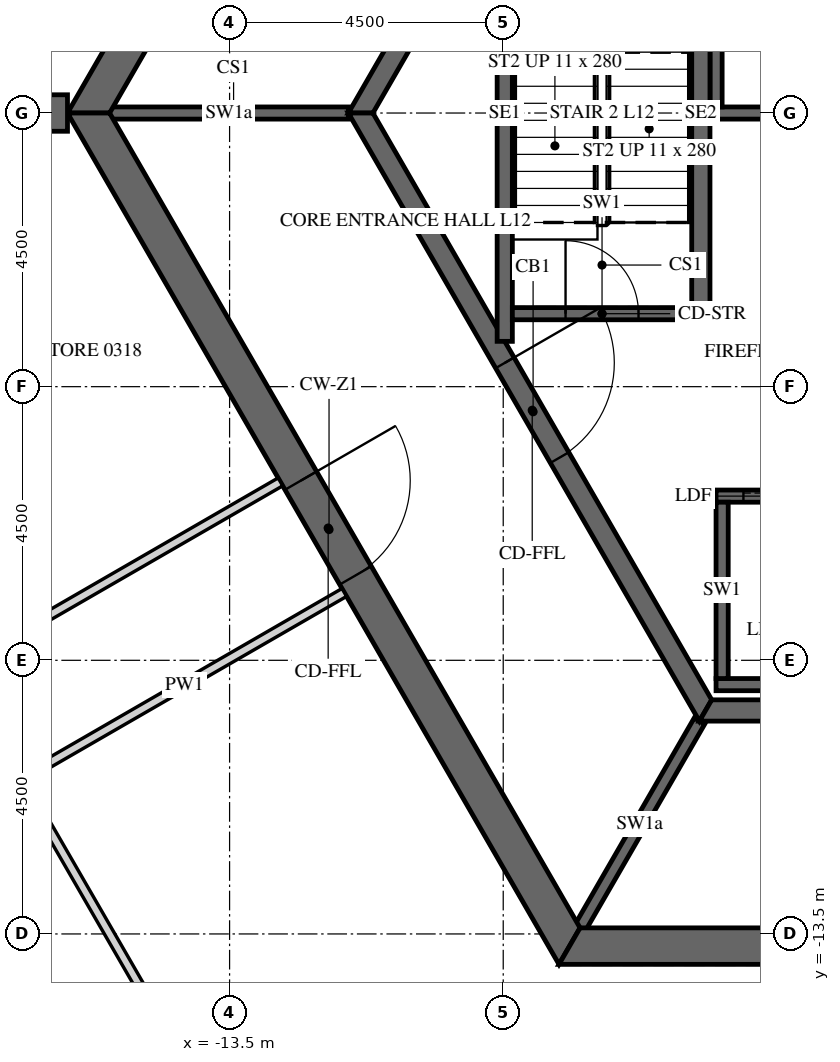
"""IFC4 building model, lengths in metres.
Left out: names, types, materials, properties, quantities, classifications, styles, units other than length and angle.
Written with IfcOpenShell. Run it as: python <this file> out.ifc"""

import sys

from ifc_helpers import new_model, si_unit, direction, frame, frame_2d, origin, place, context, subcontext, project, spatial, polyline, rectangle, outline, extrude, element, fill, save


model = new_model("IFC4")
c1 = context("Model", 3, precision=1e-05, world=origin(), true_north=direction((0.0, 1.0)))
c2 = subcontext(c1, "Body", "Model", "MODEL_VIEW")
j1 = project(units=[si_unit("LENGTHUNIT", "METRE"), si_unit("PLANEANGLEUNIT", "RADIAN")], contexts=[c1])
p1 = place(None, origin())
s1 = spatial("IfcSite", under=j1, at=p1, CompositionType="ELEMENT")
p2 = place(p1, origin())
s2 = spatial("IfcBuilding", under=s1, at=p2, CompositionType="ELEMENT")
p3 = place(p2, frame((0.0, 0.0, 60.9)))
s3 = spatial("IfcBuildingStorey", under=s2, at=p3, CompositionType="ELEMENT", Elevation=60.9)
p4 = place(p3, frame((-7.91, 13.7, -0.15), z_axis=(0.0, 0.0, 1.0), x_axis=(-0.499999880136, -0.866025472988, 0.0)))
e1 = element("IfcWall", 1, at=p4, inside=s3, PredefinedType="SHEAR", context=c2, shape_type="SweptSolid", body=[
    extrude(outline(polyline([(-0.173, -0.3), (15.993, -0.3), (15.646, 0.3), (0.173, 0.3), (-0.173, -0.3)])), origin(), (0.0, 0.0, 1.0), 3.9),
])
p5 = place(p4, frame((7.039, 0.0, 0.15)))
e2 = element("IfcOpeningElement", 2, at=p5, cuts=e1, PredefinedType="OPENING", context=c2, shape_type="SweptSolid", body=[
    extrude(rectangle(XDim=1.8, YDim=2.4, at=frame_2d((0.9, 1.2))), frame((0.0, 0.31, 0.0), z_axis=(0.0, -1.0, 0.0), x_axis=(1.0, 0.0, 0.0)), (0.0, 0.0, 1.0), 0.62),
])
p6 = place(p3, frame((-15.819, 0.0, -0.15), z_axis=(0.0, 0.0, 1.0), x_axis=(0.499999880136, -0.866025472988, 0.0)))
e3 = element("IfcWall", 3, at=p6, inside=s3, PredefinedType="SHEAR", context=c2, shape_type="SweptSolid", body=[
    extrude(outline(polyline([(-0.173, -0.3), (15.993, -0.3), (15.646, 0.3), (0.173, 0.3), (-0.173, -0.3)])), origin(), (0.0, 0.0, 1.0), 3.9),
])
p7 = place(p6, frame((6.981, 0.0, 0.15)))
e4 = element("IfcOpeningElement", 4, at=p7, cuts=e3, PredefinedType="OPENING", context=c2, shape_type="SweptSolid", body=[
    extrude(rectangle(XDim=1.8, YDim=2.4, at=frame_2d((0.9, 1.2))), frame((0.0, 0.31, 0.0), z_axis=(0.0, -1.0, 0.0), x_axis=(1.0, 0.0, 0.0)), (0.0, 0.0, 1.0), 0.62),
])
p8 = place(p3, frame((-7.91, -13.7, -0.15), z_axis=(0.0, 0.0, 1.0), x_axis=(1.0, 0.0, 0.0)))
e5 = element("IfcWall", 5, at=p8, inside=s3, PredefinedType="SHEAR", context=c2, shape_type="SweptSolid", body=[
    extrude(outline(polyline([(-0.173, -0.3), (15.993, -0.3), (15.646, 0.3), (0.173, 0.3), (-0.173, -0.3)])), origin(), (0.0, 0.0, 1.0), 3.9),
])
p9 = place(p8, frame((7.31, 0.0, 0.15)))
e6 = element("IfcOpeningElement", 6, at=p9, cuts=e5, PredefinedType="OPENING", context=c2, shape_type="SweptSolid", body=[
    extrude(rectangle(XDim=1.2, YDim=2.4, at=frame_2d((0.6, 1.2))), frame((0.0, 0.31, 0.0), z_axis=(0.0, -1.0, 0.0), x_axis=(1.0, 0.0, 0.0)), (0.0, 0.0, 1.0), 0.62),
])
p10 = place(p3, frame((-16.166, 0.0, -0.15), z_axis=(0.0, 0.0, 1.0), x_axis=(-1.0, 0.0, 0.0)))
e7 = element("IfcWall", 7, at=p10, inside=s3, PredefinedType="SHEAR", context=c2, shape_type="SweptSolid", body=[
    extrude(rectangle(XDim=16.509, YDim=0.6, at=frame_2d((8.254, 0.0))), origin(), (0.0, 0.0, 1.0), 3.9),
])
p11 = place(p10, frame((7.354, 0.0, 0.15)))
e8 = element("IfcOpeningElement", 8, at=p11, cuts=e7, PredefinedType="OPENING", context=c2, shape_type="SweptSolid", body=[
    extrude(rectangle(XDim=1.8, YDim=2.4, at=frame_2d((0.9, 1.2))), frame((0.0, 0.31, 0.0), z_axis=(0.0, -1.0, 0.0), x_axis=(1.0, 0.0, 0.0)), (0.0, 0.0, 1.0), 0.62),
])
p12 = place(p3, frame((-5.673, 9.825, -0.15), z_axis=(0.0, 0.0, 1.0), x_axis=(-0.499995046907, -0.866028263435, 0.0)))
e9 = element("IfcWall", 9, at=p12, inside=s3, PredefinedType="SHEAR", context=c2, shape_type="SweptSolid", body=[
    extrude(outline(polyline([(-0.101, -0.175), (11.446, -0.175), (11.244, 0.175), (0.101, 0.175), (-0.101, -0.175)])), origin(), (0.0, 0.0, 1.0), 3.9),
])
p13 = place(p12, frame((4.801, 0.0, 0.15)))
e10 = element("IfcOpeningElement", 10, at=p13, cuts=e9, PredefinedType="OPENING", context=c2, shape_type="SweptSolid", body=[
    extrude(rectangle(XDim=1.8, YDim=2.4, at=frame_2d((0.9, 1.2))), frame((0.0, 0.185, 0.0), z_axis=(0.0, -1.0, 0.0), x_axis=(1.0, 0.0, 0.0)), (0.0, 0.0, 1.0), 0.37),
])
p14 = place(p3, frame((-11.345, 0.0, -0.15), z_axis=(0.0, 0.0, 1.0), x_axis=(0.499995046907, -0.866028263435, 0.0)))
e11 = element("IfcWall", 11, at=p14, inside=s3, PredefinedType="SHEAR", context=c2, shape_type="SweptSolid", body=[
    extrude(outline(polyline([(-0.101, -0.175), (11.446, -0.175), (11.244, 0.175), (0.101, 0.175), (-0.101, -0.175)])), origin(), (0.0, 0.0, 1.0), 3.9),
])
p15 = place(p14, frame((4.744, 0.0, 0.15)))
e12 = element("IfcOpeningElement", 12, at=p15, cuts=e11, PredefinedType="OPENING", context=c2, shape_type="SweptSolid", body=[
    extrude(rectangle(XDim=1.8, YDim=2.4, at=frame_2d((0.9, 1.2))), frame((0.0, 0.185, 0.0), z_axis=(0.0, -1.0, 0.0), x_axis=(1.0, 0.0, 0.0)), (0.0, 0.0, 1.0), 0.37),
])
p16 = place(p3, frame((-5.673, -9.825, -0.15), z_axis=(0.0, 0.0, 1.0), x_axis=(1.0, 0.0, 0.0)))
e13 = element("IfcWall", 13, at=p16, inside=s3, PredefinedType="SHEAR", context=c2, shape_type="SweptSolid", body=[
    extrude(outline(polyline([(-0.101, -0.175), (11.446, -0.175), (11.244, 0.175), (0.101, 0.175), (-0.101, -0.175)])), origin(), (0.0, 0.0, 1.0), 3.9),
])
p17 = place(p3, frame((-5.6, 0.0, -0.25), z_axis=(0.0, 0.0, 1.0), x_axis=(1.0, 0.0, 0.0)))
e14 = element("IfcWall", 14, at=p17, inside=s3, PredefinedType="SHEAR", context=c2, shape_type="SweptSolid", body=[
    extrude(rectangle(XDim=11.2, YDim=0.2, at=frame_2d((5.6, 0.0))), origin(), (0.0, 0.0, 1.0), 3.9),
])
p18 = place(p3, frame((-5.5, 0.1, -0.25), z_axis=(0.0, 0.0, 1.0), x_axis=(0.0, 1.0, 0.0)))
e15 = element("IfcWall", 15, at=p18, inside=s3, PredefinedType="SHEAR", context=c2, shape_type="SweptSolid", body=[
    extrude(rectangle(XDim=3.1, YDim=0.2, at=frame_2d((1.55, 0.0))), origin(), (0.0, 0.0, 1.0), 3.9),
])
p19 = place(p3, frame((-5.5, -6.3, -0.25), z_axis=(0.0, 0.0, 1.0), x_axis=(1.0, 0.0, 0.0)))
e16 = element("IfcWall", 16, at=p19, inside=s3, PredefinedType="SHEAR", context=c2, shape_type="SweptSolid", body=[
    extrude(rectangle(XDim=9.2, YDim=0.2, at=frame_2d((4.6, 0.0))), origin(), (0.0, 0.0, 1.0), 3.9),
])
p20 = place(p19, frame((0.45, 0.0, 0.25)))
e17 = element("IfcOpeningElement", 17, at=p20, cuts=e16, PredefinedType="OPENING", context=c2, shape_type="SweptSolid", body=[
    extrude(rectangle(XDim=1.1, YDim=2.1, at=frame_2d((0.55, 1.05))), frame((0.0, 0.11, 0.0), z_axis=(0.0, -1.0, 0.0), x_axis=(1.0, 0.0, 0.0)), (0.0, 0.0, 1.0), 0.22),
])
p21 = place(p19, frame((2.25, 0.0, 0.25)))
e18 = element("IfcOpeningElement", 18, at=p21, cuts=e16, PredefinedType="OPENING", context=c2, shape_type="SweptSolid", body=[
    extrude(rectangle(XDim=1.1, YDim=2.1, at=frame_2d((0.55, 1.05))), frame((0.0, 0.11, 0.0), z_axis=(0.0, -1.0, 0.0), x_axis=(1.0, 0.0, 0.0)), (0.0, 0.0, 1.0), 0.22),
])
p22 = place(p19, frame((4.05, 0.0, 0.25)))
e19 = element("IfcOpeningElement", 19, at=p22, cuts=e16, PredefinedType="OPENING", context=c2, shape_type="SweptSolid", body=[
    extrude(rectangle(XDim=1.1, YDim=2.1, at=frame_2d((0.55, 1.05))), frame((0.0, 0.11, 0.0), z_axis=(0.0, -1.0, 0.0), x_axis=(1.0, 0.0, 0.0)), (0.0, 0.0, 1.0), 0.22),
])
p23 = place(p19, frame((5.85, 0.0, 0.25)))
e20 = element("IfcOpeningElement", 20, at=p23, cuts=e16, PredefinedType="OPENING", context=c2, shape_type="SweptSolid", body=[
    extrude(rectangle(XDim=1.1, YDim=2.1, at=frame_2d((0.55, 1.05))), frame((0.0, 0.11, 0.0), z_axis=(0.0, -1.0, 0.0), x_axis=(1.0, 0.0, 0.0)), (0.0, 0.0, 1.0), 0.22),
])
p24 = place(p19, frame((7.65, 0.0, 0.25)))
e21 = element("IfcOpeningElement", 21, at=p24, cuts=e16, PredefinedType="OPENING", context=c2, shape_type="SweptSolid", body=[
    extrude(rectangle(XDim=1.1, YDim=2.1, at=frame_2d((0.55, 1.05))), frame((0.0, 0.11, 0.0), z_axis=(0.0, -1.0, 0.0), x_axis=(1.0, 0.0, 0.0)), (0.0, 0.0, 1.0), 0.22),
])
p25 = place(p3, frame((-5.5, -9.4, -0.25), z_axis=(0.0, 0.0, 1.0), x_axis=(1.0, 0.0, 0.0)))
e22 = element("IfcWall", 22, at=p25, inside=s3, PredefinedType="SHEAR", context=c2, shape_type="SweptSolid", body=[
    extrude(rectangle(XDim=9.2, YDim=0.2, at=frame_2d((4.6, 0.0))), origin(), (0.0, 0.0, 1.0), 3.9),
])
p26 = place(p3, frame((-5.4, -9.3, -0.25), z_axis=(0.0, 0.0, 1.0), x_axis=(0.0, 1.0, 0.0)))
e23 = element("IfcWall", 23, at=p26, inside=s3, PredefinedType="SHEAR", context=c2, shape_type="SweptSolid", body=[
    extrude(rectangle(XDim=2.9, YDim=0.2, at=frame_2d((1.45, 0.0))), origin(), (0.0, 0.0, 1.0), 3.9),
])
p27 = place(p3, frame((-11.547, 0.0, -0.15), z_axis=(0.0, 0.0, 1.0), x_axis=(-1.0, 0.0, 0.0)))
e24 = element("IfcWall", 24, at=p27, inside=s3, PredefinedType="SHEAR", context=c2, shape_type="SweptSolid", body=[
    extrude(rectangle(XDim=3.926, YDim=0.2, at=frame_2d((1.963, 0.0))), origin(), (0.0, 0.0, 1.0), 3.9),
])
p28 = place(p3, frame((-5.773, -10.0, -0.15), z_axis=(0.0, 0.0, 1.0), x_axis=(-0.500038251005, -0.86600331843, 0.0)))
e25 = element("IfcWall", 25, at=p28, inside=s3, PredefinedType="SHEAR", context=c2, shape_type="SweptSolid", body=[
    extrude(rectangle(XDim=3.926, YDim=0.2, at=frame_2d((1.963, 0.0))), origin(), (0.0, 0.0, 1.0), 3.9),
])
p29 = place(p3, frame((-5.75, -3.4, -0.25), z_axis=(0.0, 0.0, 1.0), x_axis=(0.0, 1.0, 0.0)))
e26 = element("IfcWall", 26, at=p29, inside=s3, PredefinedType="SHEAR", context=c2, shape_type="SweptSolid", body=[
    extrude(rectangle(XDim=6.8, YDim=0.3, at=frame_2d((3.4, 0.0))), origin(), (0.0, 0.0, 1.0), 3.9),
])
p30 = place(p3, frame((-8.975, -3.755, -0.25), z_axis=(0.0, 0.0, 1.0), x_axis=(0.0, 1.0, 0.0)))
e27 = element("IfcWall", 27, at=p30, inside=s3, PredefinedType="SHEAR", context=c2, shape_type="SweptSolid", body=[
    extrude(rectangle(XDim=7.51, YDim=0.25, at=frame_2d((3.755, 0.0))), origin(), (0.0, 0.0, 1.0), 3.9),
])
p31 = place(p3, frame((-8.85, -3.3, -0.25), z_axis=(0.0, 0.0, 1.0), x_axis=(1.0, 0.0, 0.0)))
e28 = element("IfcWall", 28, at=p31, inside=s3, PredefinedType="SHEAR", context=c2, shape_type="SweptSolid", body=[
    extrude(rectangle(XDim=2.95, YDim=0.2, at=frame_2d((1.475, 0.0))), origin(), (0.0, 0.0, 1.0), 3.9),
])
p32 = place(p31, frame((0.875, 0.0, 0.25)))
e29 = element("IfcOpeningElement", 29, at=p32, cuts=e28, PredefinedType="OPENING", context=c2, shape_type="SweptSolid", body=[
    extrude(rectangle(XDim=1.2, YDim=2.4, at=frame_2d((0.6, 1.2))), frame((0.0, 0.11, 0.0), z_axis=(0.0, -1.0, 0.0), x_axis=(1.0, 0.0, 0.0)), (0.0, 0.0, 1.0), 0.22),
])
p33 = place(p3, frame((-24.09, -2.175, 0.0), z_axis=(0.0, 0.0, 1.0), x_axis=(0.499996832073, -0.86602723278, 0.0)))
e30 = element("IfcWall", 30, at=p33, inside=s3, PredefinedType="PARTITIONING", context=c2, shape_type="SweptSolid", body=[
    extrude(rectangle(XDim=23.877, YDim=0.15, at=frame_2d((11.938, 0.0))), origin(), (0.0, 0.0, 1.0), 2.988),
])
p34 = place(p33, frame((6.443, 0.0, 0.0)))
e31 = element("IfcOpeningElement", 31, at=p34, cuts=e30, PredefinedType="OPENING", context=c2, shape_type="SweptSolid", body=[
    extrude(rectangle(XDim=1.0, YDim=2.1, at=frame_2d((0.5, 1.05))), frame((0.0, 0.085, 0.0), z_axis=(0.0, -1.0, 0.0), x_axis=(1.0, 0.0, 0.0)), (0.0, 0.0, 1.0), 0.17),
])
p35 = place(p33, frame((18.425, 0.0, 0.0)))
e32 = element("IfcOpeningElement", 32, at=p35, cuts=e30, PredefinedType="OPENING", context=c2, shape_type="SweptSolid", body=[
    extrude(rectangle(XDim=1.0, YDim=2.1, at=frame_2d((0.5, 1.05))), frame((0.0, 0.085, 0.0), z_axis=(0.0, -1.0, 0.0), x_axis=(1.0, 0.0, 0.0)), (0.0, 0.0, 1.0), 0.17),
])
p36 = place(p3, frame((-12.664, -6.066, 0.0), z_axis=(0.0, 0.0, 1.0), x_axis=(-0.866023618125, -0.500003092839, 0.0)))
e33 = element("IfcWall", 33, at=p36, inside=s3, PredefinedType="PARTITIONING", context=c2, shape_type="SweptSolid", body=[
    extrude(rectangle(XDim=6.15, YDim=0.15, at=frame_2d((3.075, 0.0))), origin(), (0.0, 0.0, 1.0), 2.988),
])
p37 = place(p3, frame((-11.197, -20.907, 0.0), z_axis=(0.0, 0.0, 1.0), x_axis=(-0.500004557924, 0.86602277225, 0.0)))
e34 = element("IfcWall", 34, at=p37, inside=s3, PredefinedType="PARTITIONING", context=c2, shape_type="SweptSolid", body=[
    extrude(rectangle(XDim=11.487, YDim=0.15, at=frame_2d((5.743, 0.0))), origin(), (0.0, 0.0, 1.0), 2.988),
])
p38 = place(p37, frame((5.293, 0.0, 0.0)))
e35 = element("IfcOpeningElement", 35, at=p38, cuts=e34, PredefinedType="OPENING", context=c2, shape_type="SweptSolid", body=[
    extrude(rectangle(XDim=0.9, YDim=2.1, at=frame_2d((0.45, 1.05))), frame((0.0, 0.085, 0.0), z_axis=(0.0, -1.0, 0.0), x_axis=(1.0, 0.0, 0.0)), (0.0, 0.0, 1.0), 0.17),
])
p39 = place(p3, frame((-16.875, -10.922, 0.0), z_axis=(0.0, 0.0, 1.0), x_axis=(0.866023634079, 0.500003065207, 0.0)))
e36 = element("IfcWall", 36, at=p39, inside=s3, PredefinedType="PARTITIONING", context=c2, shape_type="SweptSolid", body=[
    extrude(rectangle(XDim=6.075, YDim=0.15, at=frame_2d((3.038, 0.0))), origin(), (0.0, 0.0, 1.0), 2.988),
])
p40 = place(p7, origin())
e37 = element("IfcDoor", 37, at=p40, inside=s3, OperationType="DOUBLE_DOOR_SINGLE_SWING", PredefinedType="DOOR", context=c2, shape_type="SweptSolid", body=[
    extrude(rectangle(XDim=1.8, YDim=2.4, at=frame_2d((0.9, 1.2))), frame((0.0, 0.025, 0.0), z_axis=(0.0, -1.0, 0.0), x_axis=(1.0, 0.0, 0.0)), (0.0, 0.0, 1.0), 0.05),
])
fill(e4, e37)
p41 = place(p15, origin())
e38 = element("IfcDoor", 38, at=p41, inside=s3, OperationType="DOUBLE_DOOR_SINGLE_SWING", PredefinedType="DOOR", context=c2, shape_type="SweptSolid", body=[
    extrude(rectangle(XDim=1.8, YDim=2.4, at=frame_2d((0.9, 1.2))), frame((0.0, 0.025, 0.0), z_axis=(0.0, -1.0, 0.0), x_axis=(1.0, 0.0, 0.0)), (0.0, 0.0, 1.0), 0.05),
])
fill(e12, e38)
p42 = place(p32, origin())
e39 = element("IfcDoor", 39, at=p42, inside=s3, OperationType="SINGLE_SWING_LEFT", PredefinedType="DOOR", context=c2, shape_type="SweptSolid", body=[
    extrude(rectangle(XDim=1.2, YDim=2.4, at=frame_2d((0.6, 1.2))), frame((0.0, 0.025, 0.0), z_axis=(0.0, -1.0, 0.0), x_axis=(1.0, 0.0, 0.0)), (0.0, 0.0, 1.0), 0.05),
])
fill(e29, e39)
p43 = place(p20, origin())
e40 = element("IfcDoor", 40, at=p43, inside=s3, OperationType="SLIDING_TO_LEFT", PredefinedType="DOOR", context=c2, shape_type="SweptSolid", body=[
    extrude(rectangle(XDim=1.1, YDim=2.1, at=frame_2d((0.55, 1.05))), frame((0.0, 0.025, 0.0), z_axis=(0.0, -1.0, 0.0), x_axis=(1.0, 0.0, 0.0)), (0.0, 0.0, 1.0), 0.05),
])
fill(e17, e40)
save(model, sys.argv[1])
